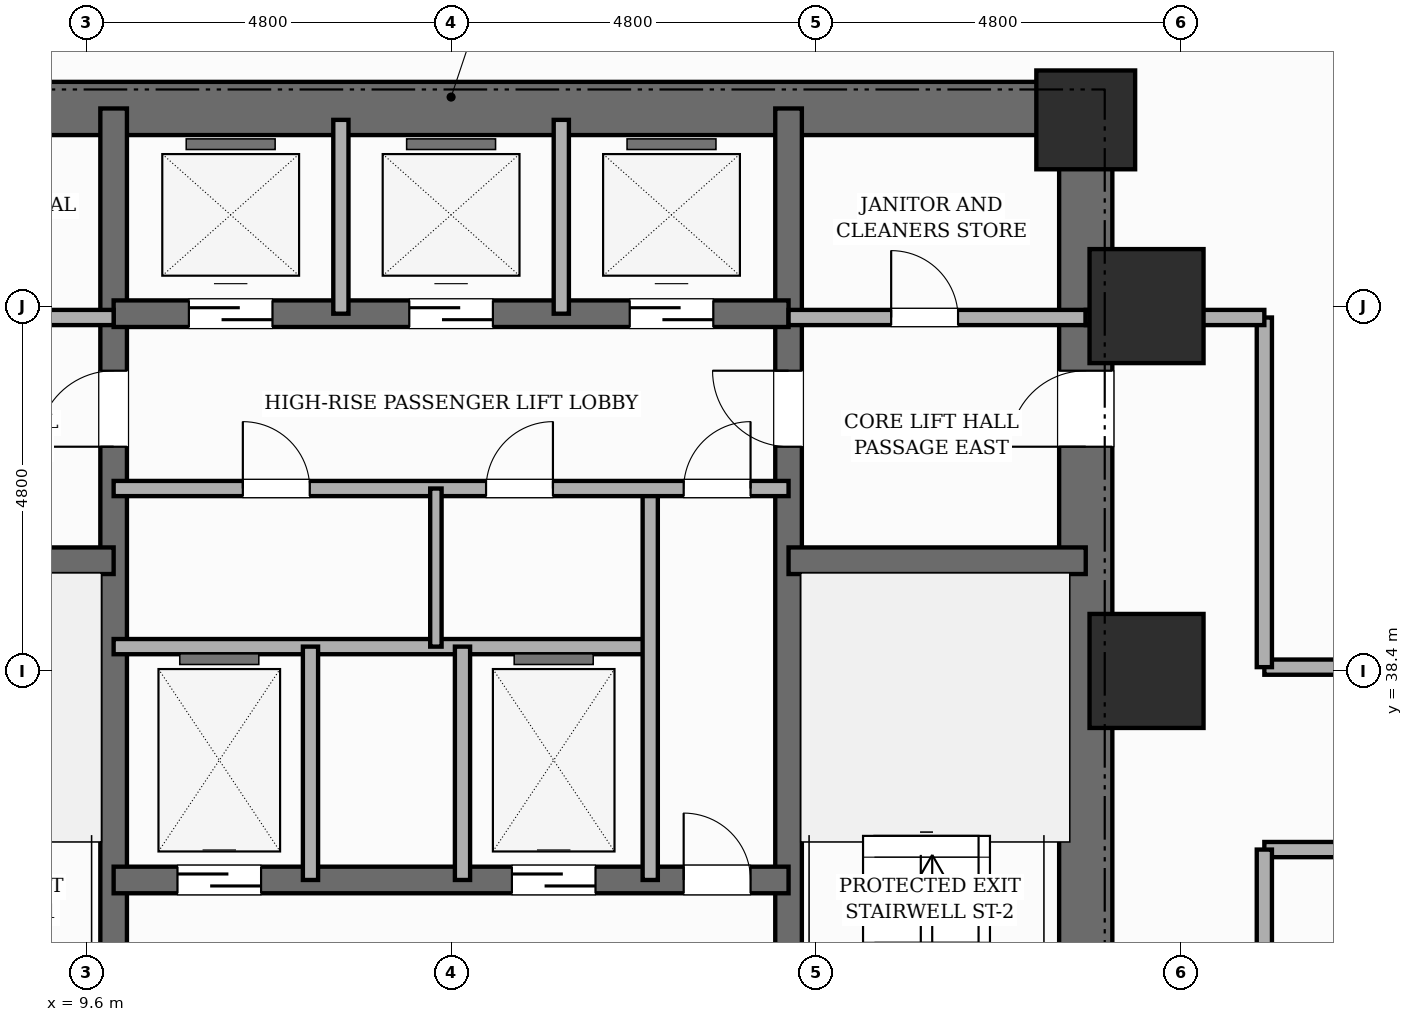
"""IFC4 building model, lengths in metres.
Left out: names, types, materials, properties, quantities, classifications, styles, units other than length and angle.
Written with IfcOpenShell. Run it as: python <this file> out.ifc"""

import sys

from ifc_helpers import new_model, si_unit, direction, frame, frame_2d, origin, origin_2d, place, context, subcontext, project, spatial, rectangle, extrude, element, fill, save


model = new_model("IFC4")
c1 = context("Model", 3, precision=1e-05, world=origin(), true_north=direction((0.0, 1.0)))
c2 = subcontext(c1, "Body", "Model", "MODEL_VIEW")
j1 = project(units=[si_unit("LENGTHUNIT", "METRE"), si_unit("PLANEANGLEUNIT", "RADIAN")], contexts=[c1])
p1 = place(None, origin())
s1 = spatial("IfcSite", under=j1, at=p1, CompositionType="ELEMENT")
p2 = place(p1, origin())
s2 = spatial("IfcBuilding", under=s1, at=p2, CompositionType="ELEMENT")
p3 = place(p2, frame((0.0, 0.0, -13.2)))
s3 = spatial("IfcBuildingStorey", under=s2, at=p3, CompositionType="ELEMENT", Elevation=-13.2)
p4 = place(p3, frame((22.75, 30.55, 0.0), z_axis=(0.0, 0.0, 1.0), x_axis=(0.0, 1.0, 0.0)))
e1 = element("IfcWall", 1, at=p4, inside=s3, PredefinedType="SHEAR", context=c2, shape_type="SweptSolid", body=[
    extrude(rectangle(XDim=15.6, YDim=0.7, at=frame_2d((7.8, 0.0))), origin(), (0.0, 0.0, 1.0), 4.4),
])
p5 = place(p4, frame((10.8, 0.0, 0.0)))
e2 = element("IfcOpeningElement", 2, at=p5, cuts=e1, PredefinedType="OPENING", context=c2, shape_type="SweptSolid", body=[
    extrude(rectangle(XDim=1.0, YDim=2.15, at=frame_2d((0.5, 1.075))), frame((0.0, 0.36, 0.0), z_axis=(0.0, -1.0, 0.0), x_axis=(1.0, 0.0, 0.0)), (0.0, 0.0, 1.0), 0.72),
])
p6 = place(p3, frame((6.05, 45.8, 0.0), z_axis=(0.0, 0.0, 1.0), x_axis=(1.0, 0.0, 0.0)))
e3 = element("IfcWall", 3, at=p6, inside=s3, PredefinedType="SHEAR", context=c2, shape_type="SweptSolid", body=[
    extrude(rectangle(XDim=16.7, YDim=0.7, at=frame_2d((8.35, 0.0))), origin(), (0.0, 0.0, 1.0), 4.4),
])
p7 = place(p3, frame((9.96, 30.9, 0.0), z_axis=(0.0, 0.0, 1.0), x_axis=(0.0, 1.0, 0.0)))
e4 = element("IfcWall", 4, at=p7, inside=s3, PredefinedType="SHEAR", context=c2, shape_type="SweptSolid", body=[
    extrude(rectangle(XDim=14.9, YDim=0.35, at=frame_2d((7.45, 0.0))), origin(), (0.0, 0.0, 1.0), 4.4),
])
p8 = place(p7, frame((0.65, 0.0, 0.0)))
e5 = element("IfcOpeningElement", 5, at=p8, cuts=e4, PredefinedType="OPENING", context=c2, shape_type="SweptSolid", body=[
    extrude(rectangle(XDim=0.95, YDim=2.1, at=frame_2d((0.475, 1.05))), frame((0.0, 0.185, 0.0), z_axis=(0.0, -1.0, 0.0), x_axis=(1.0, 0.0, 0.0)), (0.0, 0.0, 1.0), 0.37),
])
p9 = place(p7, frame((10.45, 0.0, 0.0)))
e6 = element("IfcOpeningElement", 6, at=p9, cuts=e4, PredefinedType="OPENING", context=c2, shape_type="SweptSolid", body=[
    extrude(rectangle(XDim=1.0, YDim=2.15, at=frame_2d((0.5, 1.075))), frame((0.0, 0.185, 0.0), z_axis=(0.0, -1.0, 0.0), x_axis=(1.0, 0.0, 0.0)), (0.0, 0.0, 1.0), 0.37),
])
p10 = place(p3, frame((18.84, 30.9, 0.0), z_axis=(0.0, 0.0, 1.0), x_axis=(0.0, 1.0, 0.0)))
e7 = element("IfcWall", 7, at=p10, inside=s3, PredefinedType="SHEAR", context=c2, shape_type="SweptSolid", body=[
    extrude(rectangle(XDim=14.9, YDim=0.35, at=frame_2d((7.45, 0.0))), origin(), (0.0, 0.0, 1.0), 4.4),
])
p11 = place(p10, frame((0.65, 0.0, 0.0)))
e8 = element("IfcOpeningElement", 8, at=p11, cuts=e7, PredefinedType="OPENING", context=c2, shape_type="SweptSolid", body=[
    extrude(rectangle(XDim=0.95, YDim=2.1, at=frame_2d((0.475, 1.05))), frame((0.0, 0.185, 0.0), z_axis=(0.0, -1.0, 0.0), x_axis=(1.0, 0.0, 0.0)), (0.0, 0.0, 1.0), 0.37),
])
p12 = place(p10, frame((10.45, 0.0, 0.0)))
e9 = element("IfcOpeningElement", 9, at=p12, cuts=e7, PredefinedType="OPENING", context=c2, shape_type="SweptSolid", body=[
    extrude(rectangle(XDim=1.0, YDim=2.15, at=frame_2d((0.5, 1.075))), frame((0.0, 0.185, 0.0), z_axis=(0.0, -1.0, 0.0), x_axis=(1.0, 0.0, 0.0)), (0.0, 0.0, 1.0), 0.37),
])
for number, where, z_axis, x_axis in (
    (10, (6.05, 39.85, 0.0), (0.0, 0.0, 1.0), (1.0, 0.0, 0.0)),
    (11, (18.84, 39.85, 0.0), (0.0, 0.0, 1.0), (1.0, 0.0, 0.0)),
):
    element("IfcWall", number, at=place(p3, frame(where, z_axis=z_axis, x_axis=x_axis)), inside=s3, PredefinedType="SHEAR", context=c2, shape_type="SweptSolid", body=[
        extrude(rectangle(XDim=3.91, YDim=0.35, at=frame_2d((1.955, 0.0))), origin(), (0.0, 0.0, 1.0), 4.4),
    ])
p13 = place(p3, frame((9.96, 35.65, 0.0), z_axis=(0.0, 0.0, 1.0), x_axis=(1.0, 0.0, 0.0)))
e12 = element("IfcWall", 12, at=p13, inside=s3, PredefinedType="SHEAR", context=c2, shape_type="SweptSolid", body=[
    extrude(rectangle(XDim=8.88, YDim=0.35, at=frame_2d((4.44, 0.0))), origin(), (0.0, 0.0, 1.0), 4.4),
])
p14 = place(p13, frame((0.84, 0.0, 0.0)))
e13 = element("IfcOpeningElement", 13, at=p14, cuts=e12, PredefinedType="OPENING", context=c2, shape_type="SweptSolid", body=[
    extrude(rectangle(XDim=1.1, YDim=2.15, at=frame_2d((0.55, 1.075))), frame((0.0, 0.185, 0.0), z_axis=(0.0, -1.0, 0.0), x_axis=(1.0, 0.0, 0.0)), (0.0, 0.0, 1.0), 0.37),
])
p15 = place(p13, frame((5.24, 0.0, 0.0)))
e14 = element("IfcOpeningElement", 14, at=p15, cuts=e12, PredefinedType="OPENING", context=c2, shape_type="SweptSolid", body=[
    extrude(rectangle(XDim=1.1, YDim=2.15, at=frame_2d((0.55, 1.075))), frame((0.0, 0.185, 0.0), z_axis=(0.0, -1.0, 0.0), x_axis=(1.0, 0.0, 0.0)), (0.0, 0.0, 1.0), 0.37),
])
p16 = place(p13, frame((7.5, 0.0, 0.0)))
e15 = element("IfcOpeningElement", 15, at=p16, cuts=e12, PredefinedType="OPENING", context=c2, shape_type="SweptSolid", body=[
    extrude(rectangle(XDim=0.88, YDim=2.1, at=frame_2d((0.44, 1.05))), frame((0.0, 0.185, 0.0), z_axis=(0.0, -1.0, 0.0), x_axis=(1.0, 0.0, 0.0)), (0.0, 0.0, 1.0), 0.37),
])
p17 = place(p3, frame((9.96, 43.1, 0.0), z_axis=(0.0, 0.0, 1.0), x_axis=(1.0, 0.0, 0.0)))
e16 = element("IfcWall", 16, at=p17, inside=s3, PredefinedType="SHEAR", context=c2, shape_type="SweptSolid", body=[
    extrude(rectangle(XDim=8.88, YDim=0.35, at=frame_2d((4.44, 0.0))), origin(), (0.0, 0.0, 1.0), 4.4),
])
p18 = place(p17, frame((0.99, 0.0, 0.0)))
e17 = element("IfcOpeningElement", 17, at=p18, cuts=e16, PredefinedType="OPENING", context=c2, shape_type="SweptSolid", body=[
    extrude(rectangle(XDim=1.1, YDim=2.15, at=frame_2d((0.55, 1.075))), frame((0.0, 0.185, 0.0), z_axis=(0.0, -1.0, 0.0), x_axis=(1.0, 0.0, 0.0)), (0.0, 0.0, 1.0), 0.37),
])
p19 = place(p17, frame((3.89, 0.0, 0.0)))
e18 = element("IfcOpeningElement", 18, at=p19, cuts=e16, PredefinedType="OPENING", context=c2, shape_type="SweptSolid", body=[
    extrude(rectangle(XDim=1.1, YDim=2.15, at=frame_2d((0.55, 1.075))), frame((0.0, 0.185, 0.0), z_axis=(0.0, -1.0, 0.0), x_axis=(1.0, 0.0, 0.0)), (0.0, 0.0, 1.0), 0.37),
])
p20 = place(p17, frame((6.79, 0.0, 0.0)))
e19 = element("IfcOpeningElement", 19, at=p20, cuts=e16, PredefinedType="OPENING", context=c2, shape_type="SweptSolid", body=[
    extrude(rectangle(XDim=1.1, YDim=2.15, at=frame_2d((0.55, 1.075))), frame((0.0, 0.185, 0.0), z_axis=(0.0, -1.0, 0.0), x_axis=(1.0, 0.0, 0.0)), (0.0, 0.0, 1.0), 0.37),
])
p21 = place(p3, frame((22.75, 45.65, 0.0), z_axis=(0.0, 0.0, 1.0), x_axis=(1.0, 0.0, 0.0)))
e20 = element("IfcColumn", 20, at=p21, inside=s3, PredefinedType="COLUMN", context=c2, shape_type="SweptSolid", body=[
    extrude(rectangle(XDim=1.3, YDim=1.3, at=origin_2d()), origin(), (0.0, 0.0, 1.0), 4.4),
])
for number, where, z_axis, x_axis in (
    (21, (23.55, 38.4, 0.0), (0.0, 0.0, 1.0), (1.0, 0.0, 0.0)),
    (22, (23.55, 43.2, 0.0), (0.0, 0.0, 1.0), (1.0, 0.0, 0.0)),
):
    element("IfcColumn", number, at=place(p3, frame(where, z_axis=z_axis, x_axis=x_axis)), inside=s3, PredefinedType="USERDEFINED", context=c2, shape_type="SweptSolid", body=[
        extrude(rectangle(XDim=1.5, YDim=1.5, at=origin_2d()), origin(), (0.0, 0.0, 1.0), 4.4),
    ])
p22 = place(p3, frame((9.96, 38.72, 0.0), z_axis=(0.0, 0.0, 1.0), x_axis=(1.0, 0.0, 0.0)))
e23 = element("IfcWall", 23, at=p22, inside=s3, PredefinedType="POLYGONAL", context=c2, shape_type="SweptSolid", body=[
    extrude(rectangle(XDim=7.06, YDim=0.2, at=frame_2d((3.53, 0.0))), origin(), (0.0, 0.0, 1.0), 4.08),
])
for number, where, z_axis, x_axis in (
    (24, (12.55, 35.65, 0.0), (0.0, 0.0, 1.0), (0.0, 1.0, 0.0)),
    (25, (14.55, 35.65, 0.0), (0.0, 0.0, 1.0), (0.0, 1.0, 0.0)),
):
    element("IfcWall", number, at=place(p3, frame(where, z_axis=z_axis, x_axis=x_axis)), inside=s3, PredefinedType="POLYGONAL", context=c2, shape_type="SweptSolid", body=[
        extrude(rectangle(XDim=3.07, YDim=0.2, at=frame_2d((1.535, 0.0))), origin(), (0.0, 0.0, 1.0), 4.08),
    ])
p23 = place(p3, frame((17.02, 35.65, 0.0), z_axis=(0.0, 0.0, 1.0), x_axis=(0.0, 1.0, 0.0)))
e26 = element("IfcWall", 26, at=p23, inside=s3, PredefinedType="POLYGONAL", context=c2, shape_type="SweptSolid", body=[
    extrude(rectangle(XDim=5.15, YDim=0.2, at=frame_2d((2.575, 0.0))), origin(), (0.0, 0.0, 1.0), 4.08),
])
p24 = place(p3, frame((9.96, 40.8, 0.0), z_axis=(0.0, 0.0, 1.0), x_axis=(1.0, 0.0, 0.0)))
e27 = element("IfcWall", 27, at=p24, inside=s3, PredefinedType="POLYGONAL", context=c2, shape_type="SweptSolid", body=[
    extrude(rectangle(XDim=8.88, YDim=0.2, at=frame_2d((4.44, 0.0))), origin(), (0.0, 0.0, 1.0), 4.08),
])
p25 = place(p24, frame((7.5, 0.0, 0.0)))
e28 = element("IfcOpeningElement", 28, at=p25, cuts=e27, PredefinedType="OPENING", context=c2, shape_type="SweptSolid", body=[
    extrude(rectangle(XDim=0.88, YDim=2.1, at=frame_2d((0.44, 1.05))), frame((0.0, 0.11, 0.0), z_axis=(0.0, -1.0, 0.0), x_axis=(1.0, 0.0, 0.0)), (0.0, 0.0, 1.0), 0.22),
])
p26 = place(p24, frame((1.7, 0.0, 0.0)))
e29 = element("IfcOpeningElement", 29, at=p26, cuts=e27, PredefinedType="OPENING", context=c2, shape_type="SweptSolid", body=[
    extrude(rectangle(XDim=0.88, YDim=2.1, at=frame_2d((0.44, 1.05))), frame((0.0, 0.11, 0.0), z_axis=(0.0, -1.0, 0.0), x_axis=(1.0, 0.0, 0.0)), (0.0, 0.0, 1.0), 0.22),
])
p27 = place(p24, frame((4.9, 0.0, 0.0)))
e30 = element("IfcOpeningElement", 30, at=p27, cuts=e27, PredefinedType="OPENING", context=c2, shape_type="SweptSolid", body=[
    extrude(rectangle(XDim=0.88, YDim=2.1, at=frame_2d((0.44, 1.05))), frame((0.0, 0.11, 0.0), z_axis=(0.0, -1.0, 0.0), x_axis=(1.0, 0.0, 0.0)), (0.0, 0.0, 1.0), 0.22),
])
p28 = place(p3, frame((18.84, 43.05, 0.0), z_axis=(0.0, 0.0, 1.0), x_axis=(1.0, 0.0, 0.0)))
e31 = element("IfcWall", 31, at=p28, inside=s3, PredefinedType="POLYGONAL", context=c2, shape_type="SweptSolid", body=[
    extrude(rectangle(XDim=3.91, YDim=0.2, at=frame_2d((1.955, 0.0))), origin(), (0.0, 0.0, 1.0), 3.28),
])
p29 = place(p28, frame((1.35, 0.0, 0.0)))
e32 = element("IfcOpeningElement", 32, at=p29, cuts=e31, PredefinedType="OPENING", context=c2, shape_type="SweptSolid", body=[
    extrude(rectangle(XDim=0.88, YDim=2.1, at=frame_2d((0.44, 1.05))), frame((0.0, 0.11, 0.0), z_axis=(0.0, -1.0, 0.0), x_axis=(1.0, 0.0, 0.0)), (0.0, 0.0, 1.0), 0.22),
])
p30 = place(p3, frame((6.05, 43.05, 0.0), z_axis=(0.0, 0.0, 1.0), x_axis=(1.0, 0.0, 0.0)))
e33 = element("IfcWall", 33, at=p30, inside=s3, PredefinedType="POLYGONAL", context=c2, shape_type="SweptSolid", body=[
    extrude(rectangle(XDim=3.91, YDim=0.2, at=frame_2d((1.955, 0.0))), origin(), (0.0, 0.0, 1.0), 3.28),
])
p31 = place(p30, frame((1.35, 0.0, 0.0)))
e34 = element("IfcOpeningElement", 34, at=p31, cuts=e33, PredefinedType="OPENING", context=c2, shape_type="SweptSolid", body=[
    extrude(rectangle(XDim=0.88, YDim=2.1, at=frame_2d((0.44, 1.05))), frame((0.0, 0.11, 0.0), z_axis=(0.0, -1.0, 0.0), x_axis=(1.0, 0.0, 0.0)), (0.0, 0.0, 1.0), 0.22),
])
for number, where, z_axis, x_axis in (
    (35, (12.95, 43.1, 0.0), (0.0, 0.0, 1.0), (0.0, 1.0, 0.0)),
    (36, (15.85, 43.1, 0.0), (0.0, 0.0, 1.0), (0.0, 1.0, 0.0)),
):
    element("IfcWall", number, at=place(p3, frame(where, z_axis=z_axis, x_axis=x_axis)), inside=s3, PredefinedType="POLYGONAL", context=c2, shape_type="SweptSolid", body=[
        extrude(rectangle(XDim=2.55, YDim=0.2, at=frame_2d((1.275, 0.0))), origin(), (0.0, 0.0, 1.0), 4.08),
    ])
p32 = place(p3, frame((14.2, 38.72, 0.0), z_axis=(0.0, 0.0, 1.0), x_axis=(0.0, 1.0, 0.0)))
e37 = element("IfcWall", 37, at=p32, inside=s3, PredefinedType="PARTITIONING", context=c2, shape_type="SweptSolid", body=[
    extrude(rectangle(XDim=2.08, YDim=0.15, at=frame_2d((1.04, 0.0))), origin(), (0.0, 0.0, 1.0), 4.08),
])
p33 = place(p3, frame((25.1, 36.05, 0.0), z_axis=(0.0, 0.0, 1.0), x_axis=(1.0, 0.0, 0.0)))
e38 = element("IfcWall", 38, at=p33, inside=s3, PredefinedType="PARTITIONING", context=c2, shape_type="SweptSolid", body=[
    extrude(rectangle(XDim=18.92, YDim=0.2, at=frame_2d((9.46, 0.0))), origin(), (0.0, 0.0, 1.0), 4.08),
])
p34 = place(p33, frame((4.2, 0.0, 0.0)))
e39 = element("IfcOpeningElement", 39, at=p34, cuts=e38, PredefinedType="OPENING", context=c2, shape_type="SweptSolid", body=[
    extrude(rectangle(XDim=1.0, YDim=2.15, at=frame_2d((0.5, 1.075))), frame((0.0, 0.11, 0.0), z_axis=(0.0, -1.0, 0.0), x_axis=(1.0, 0.0, 0.0)), (0.0, 0.0, 1.0), 0.22),
])
p35 = place(p3, frame((25.1, 38.45, 0.0), z_axis=(0.0, 0.0, 1.0), x_axis=(1.0, 0.0, 0.0)))
e40 = element("IfcWall", 40, at=p35, inside=s3, PredefinedType="PARTITIONING", context=c2, shape_type="SweptSolid", body=[
    extrude(rectangle(XDim=18.92, YDim=0.2, at=frame_2d((9.46, 0.0))), origin(), (0.0, 0.0, 1.0), 4.08),
])
p36 = place(p35, frame((5.2, 0.0, 0.0)))
e41 = element("IfcOpeningElement", 41, at=p36, cuts=e40, PredefinedType="OPENING", context=c2, shape_type="SweptSolid", body=[
    extrude(rectangle(XDim=1.0, YDim=2.15, at=frame_2d((0.5, 1.075))), frame((0.0, 0.11, 0.0), z_axis=(0.0, -1.0, 0.0), x_axis=(1.0, 0.0, 0.0)), (0.0, 0.0, 1.0), 0.22),
])
p37 = place(p35, frame((10.9, 0.0, 0.0)))
e42 = element("IfcOpeningElement", 42, at=p37, cuts=e40, PredefinedType="OPENING", context=c2, shape_type="SweptSolid", body=[
    extrude(rectangle(XDim=1.0, YDim=2.15, at=frame_2d((0.5, 1.075))), frame((0.0, 0.11, 0.0), z_axis=(0.0, -1.0, 0.0), x_axis=(1.0, 0.0, 0.0)), (0.0, 0.0, 1.0), 0.22),
])
p38 = place(p3, frame((25.1, 25.8, 0.0), z_axis=(0.0, 0.0, 1.0), x_axis=(0.0, 1.0, 0.0)))
e43 = element("IfcWall", 43, at=p38, inside=s3, PredefinedType="PARTITIONING", context=c2, shape_type="SweptSolid", body=[
    extrude(rectangle(XDim=10.25, YDim=0.2, at=frame_2d((5.125, 0.0))), origin(), (0.0, 0.0, 1.0), 4.08),
])
p39 = place(p3, frame((25.1, 38.45, 0.0), z_axis=(0.0, 0.0, 1.0), x_axis=(0.0, 1.0, 0.0)))
e44 = element("IfcWall", 44, at=p39, inside=s3, PredefinedType="PARTITIONING", context=c2, shape_type="SweptSolid", body=[
    extrude(rectangle(XDim=4.6, YDim=0.2, at=frame_2d((2.3, 0.0))), origin(), (0.0, 0.0, 1.0), 4.08),
])
p40 = place(p3, frame((22.75, 43.05, 0.0), z_axis=(0.0, 0.0, 1.0), x_axis=(1.0, 0.0, 0.0)))
e45 = element("IfcWall", 45, at=p40, inside=s3, PredefinedType="PARTITIONING", context=c2, shape_type="SweptSolid", body=[
    extrude(rectangle(XDim=2.35, YDim=0.2, at=frame_2d((1.175, 0.0))), origin(), (0.0, 0.0, 1.0), 3.28),
])
p41 = place(p14, origin())
e46 = element("IfcDoor", 46, at=p41, inside=s3, OperationType="SLIDING_TO_LEFT", PredefinedType="DOOR", context=c2, shape_type="SweptSolid", body=[
    extrude(rectangle(XDim=1.1, YDim=2.15, at=frame_2d((0.55, 1.075))), frame((0.0, 0.025, 0.0), z_axis=(0.0, -1.0, 0.0), x_axis=(1.0, 0.0, 0.0)), (0.0, 0.0, 1.0), 0.05),
])
fill(e13, e46)
p42 = place(p15, origin())
e47 = element("IfcDoor", 47, at=p42, inside=s3, OperationType="SLIDING_TO_RIGHT", PredefinedType="DOOR", context=c2, shape_type="SweptSolid", body=[
    extrude(rectangle(XDim=1.1, YDim=2.15, at=frame_2d((0.55, 1.075))), frame((0.0, 0.025, 0.0), z_axis=(0.0, -1.0, 0.0), x_axis=(1.0, 0.0, 0.0)), (0.0, 0.0, 1.0), 0.05),
])
fill(e14, e47)
p43 = place(p16, origin())
e48 = element("IfcDoor", 48, at=p43, inside=s3, OperationType="SINGLE_SWING_LEFT", PredefinedType="DOOR", context=c2, shape_type="SweptSolid", body=[
    extrude(rectangle(XDim=0.88, YDim=2.1, at=frame_2d((0.44, 1.05))), frame((0.0, 0.025, 0.0), z_axis=(0.0, -1.0, 0.0), x_axis=(1.0, 0.0, 0.0)), (0.0, 0.0, 1.0), 0.05),
])
fill(e15, e48)
p44 = place(p25, origin())
e49 = element("IfcDoor", 49, at=p44, inside=s3, OperationType="SINGLE_SWING_RIGHT", PredefinedType="DOOR", context=c2, shape_type="SweptSolid", body=[
    extrude(rectangle(XDim=0.88, YDim=2.1, at=frame_2d((0.44, 1.05))), frame((0.0, 0.025, 0.0), z_axis=(0.0, -1.0, 0.0), x_axis=(1.0, 0.0, 0.0)), (0.0, 0.0, 1.0), 0.05),
])
fill(e28, e49)
p45 = place(p18, origin())
e50 = element("IfcDoor", 50, at=p45, inside=s3, OperationType="SLIDING_TO_LEFT", PredefinedType="DOOR", context=c2, shape_type="SweptSolid", body=[
    extrude(rectangle(XDim=1.1, YDim=2.15, at=frame_2d((0.55, 1.075))), frame((0.0, 0.025, 0.0), z_axis=(0.0, -1.0, 0.0), x_axis=(1.0, 0.0, 0.0)), (0.0, 0.0, 1.0), 0.05),
])
fill(e17, e50)
p46 = place(p19, origin())
e51 = element("IfcDoor", 51, at=p46, inside=s3, OperationType="SLIDING_TO_RIGHT", PredefinedType="DOOR", context=c2, shape_type="SweptSolid", body=[
    extrude(rectangle(XDim=1.1, YDim=2.15, at=frame_2d((0.55, 1.075))), frame((0.0, 0.025, 0.0), z_axis=(0.0, -1.0, 0.0), x_axis=(1.0, 0.0, 0.0)), (0.0, 0.0, 1.0), 0.05),
])
fill(e18, e51)
p47 = place(p20, origin())
e52 = element("IfcDoor", 52, at=p47, inside=s3, OperationType="SLIDING_TO_LEFT", PredefinedType="DOOR", context=c2, shape_type="SweptSolid", body=[
    extrude(rectangle(XDim=1.1, YDim=2.15, at=frame_2d((0.55, 1.075))), frame((0.0, 0.025, 0.0), z_axis=(0.0, -1.0, 0.0), x_axis=(1.0, 0.0, 0.0)), (0.0, 0.0, 1.0), 0.05),
])
fill(e19, e52)
p48 = place(p9, origin())
e53 = element("IfcDoor", 53, at=p48, inside=s3, OperationType="SINGLE_SWING_LEFT", PredefinedType="DOOR", context=c2, shape_type="SweptSolid", body=[
    extrude(rectangle(XDim=1.0, YDim=2.15, at=frame_2d((0.5, 1.075))), frame((0.0, 0.025, 0.0), z_axis=(0.0, -1.0, 0.0), x_axis=(1.0, 0.0, 0.0)), (0.0, 0.0, 1.0), 0.05),
])
fill(e6, e53)
p49 = place(p12, origin())
e54 = element("IfcDoor", 54, at=p49, inside=s3, OperationType="SINGLE_SWING_RIGHT", PredefinedType="DOOR", context=c2, shape_type="SweptSolid", body=[
    extrude(rectangle(XDim=1.0, YDim=2.15, at=frame_2d((0.5, 1.075))), frame((0.0, 0.025, 0.0), z_axis=(0.0, -1.0, 0.0), x_axis=(1.0, 0.0, 0.0)), (0.0, 0.0, 1.0), 0.05),
])
fill(e9, e54)
p50 = place(p5, origin())
e55 = element("IfcDoor", 55, at=p50, inside=s3, OperationType="SINGLE_SWING_LEFT", PredefinedType="DOOR", context=c2, shape_type="SweptSolid", body=[
    extrude(rectangle(XDim=1.0, YDim=2.15, at=frame_2d((0.5, 1.075))), frame((0.0, 0.025, 0.0), z_axis=(0.0, -1.0, 0.0), x_axis=(1.0, 0.0, 0.0)), (0.0, 0.0, 1.0), 0.05),
])
fill(e2, e55)
p51 = place(p26, origin())
e56 = element("IfcDoor", 56, at=p51, inside=s3, OperationType="SINGLE_SWING_LEFT", PredefinedType="DOOR", context=c2, shape_type="SweptSolid", body=[
    extrude(rectangle(XDim=0.88, YDim=2.1, at=frame_2d((0.44, 1.05))), frame((0.0, 0.025, 0.0), z_axis=(0.0, -1.0, 0.0), x_axis=(1.0, 0.0, 0.0)), (0.0, 0.0, 1.0), 0.05),
])
fill(e29, e56)
p52 = place(p27, origin())
e57 = element("IfcDoor", 57, at=p52, inside=s3, OperationType="SINGLE_SWING_RIGHT", PredefinedType="DOOR", context=c2, shape_type="SweptSolid", body=[
    extrude(rectangle(XDim=0.88, YDim=2.1, at=frame_2d((0.44, 1.05))), frame((0.0, 0.025, 0.0), z_axis=(0.0, -1.0, 0.0), x_axis=(1.0, 0.0, 0.0)), (0.0, 0.0, 1.0), 0.05),
])
fill(e30, e57)
p53 = place(p29, origin())
e58 = element("IfcDoor", 58, at=p53, inside=s3, OperationType="SINGLE_SWING_LEFT", PredefinedType="DOOR", context=c2, shape_type="SweptSolid", body=[
    extrude(rectangle(XDim=0.88, YDim=2.1, at=frame_2d((0.44, 1.05))), frame((0.0, 0.025, 0.0), z_axis=(0.0, -1.0, 0.0), x_axis=(1.0, 0.0, 0.0)), (0.0, 0.0, 1.0), 0.05),
])
fill(e32, e58)
save(model, sys.argv[1])
